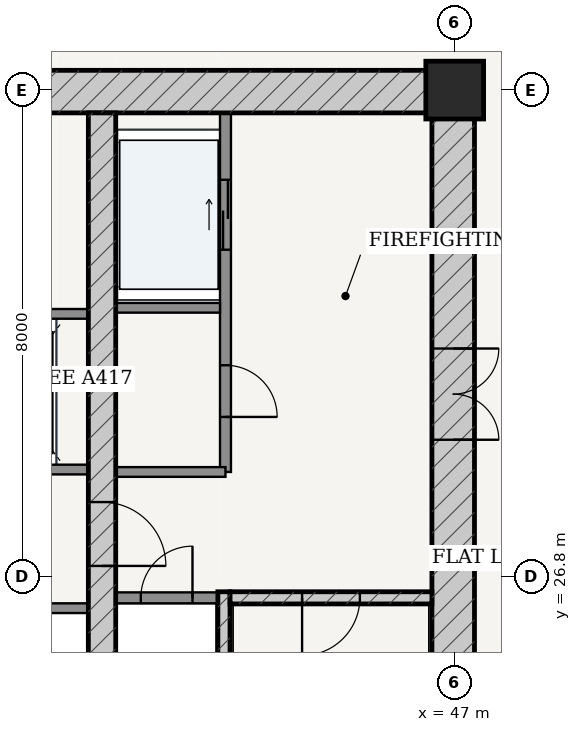
"""IFC4 building model, lengths in metres.
Left out: names, types, materials, properties, quantities, classifications, styles, units other than length and angle.
Written with IfcOpenShell. Run it as: python <this file> out.ifc"""

import sys

from ifc_helpers import new_model, si_unit, direction, frame, frame_2d, origin, origin_2d, place, context, subcontext, project, spatial, rectangle, extrude, source, transform, mapped, element, fill, save


model = new_model("IFC4")
c1 = context("Model", 3, precision=1e-05, world=origin(), true_north=direction((-0.2419218956, 0.970295726276)))
c2 = subcontext(c1, "Body", "Model", "MODEL_VIEW")
j1 = project(units=[si_unit("LENGTHUNIT", "METRE"), si_unit("PLANEANGLEUNIT", "RADIAN")], contexts=[c1])
p1 = place(None, origin())
s1 = spatial("IfcSite", under=j1, at=p1, CompositionType="ELEMENT")
p2 = place(p1, origin())
s2 = spatial("IfcBuilding", under=s1, at=p2, CompositionType="ELEMENT")
p3 = place(p2, frame((0.0, 0.0, 108.6)))
s3 = spatial("IfcBuildingStorey", under=s2, at=p3, CompositionType="ELEMENT", Elevation=108.6)
p4 = place(p3, frame((47.0, 34.8, 0.0), z_axis=(0.0, 0.0, 1.0), x_axis=(1.0, 0.0, 0.0)))
e1 = element("IfcColumn", 1, at=p4, inside=s3, PredefinedType="COLUMN", context=c2, shape_type="SweptSolid", body=[
    extrude(rectangle(XDim=0.95, YDim=0.95, at=origin_2d()), origin(), (0.0, 0.0, 1.0), 3.6),
])
p5 = place(p3, frame((28.675, 34.775, 0.0), z_axis=(0.0, 0.0, 1.0), x_axis=(1.0, 0.0, 0.0)))
e2 = element("IfcWall", 2, at=p5, inside=s3, PredefinedType="SHEAR", context=c2, shape_type="SweptSolid", body=[
    extrude(rectangle(XDim=18.65, YDim=0.7, at=frame_2d((9.325, 0.0))), origin(), (0.0, 0.0, 1.0), 3.325),
])
p6 = place(p5, frame((7.357, 0.0, 0.0)))
e3 = element("IfcOpeningElement", 3, at=p6, cuts=e2, PredefinedType="OPENING", context=c2, shape_type="SweptSolid", body=[
    extrude(rectangle(XDim=0.86, YDim=2.1, at=frame_2d((0.43, 1.05))), frame((0.0, 0.36, 0.0), z_axis=(0.0, -1.0, 0.0), x_axis=(1.0, 0.0, 0.0)), (0.0, 0.0, 1.0), 0.72),
])
p7 = place(p5, frame((10.438, 0.0, 0.0)))
e4 = element("IfcOpeningElement", 4, at=p7, cuts=e2, PredefinedType="OPENING", context=c2, shape_type="SweptSolid", body=[
    extrude(rectangle(XDim=0.85, YDim=2.1, at=frame_2d((0.425, 1.05))), frame((0.0, 0.36, 0.0), z_axis=(0.0, -1.0, 0.0), x_axis=(1.0, 0.0, 0.0)), (0.0, 0.0, 1.0), 0.72),
])
p8 = place(p3, frame((46.975, 19.175, 0.0), z_axis=(0.0, 0.0, 1.0), x_axis=(0.0, 1.0, 0.0)))
e5 = element("IfcWall", 5, at=p8, inside=s3, PredefinedType="SHEAR", context=c2, shape_type="SweptSolid", body=[
    extrude(rectangle(XDim=15.25, YDim=0.7, at=frame_2d((7.625, 0.0))), origin(), (0.0, 0.0, 1.0), 3.325),
])
p9 = place(p8, frame((9.875, 0.0, 0.0)))
e6 = element("IfcOpeningElement", 6, at=p9, cuts=e5, PredefinedType="OPENING", context=c2, shape_type="SweptSolid", body=[
    extrude(rectangle(XDim=1.5, YDim=2.2, at=frame_2d((0.75, 1.1))), frame((0.0, 0.36, 0.0), z_axis=(0.0, -1.0, 0.0), x_axis=(1.0, 0.0, 0.0)), (0.0, 0.0, 1.0), 0.72),
])
p10 = place(p3, frame((43.205, 19.175, 0.0), z_axis=(0.0, 0.0, 1.0), x_axis=(0.0, 1.0, 0.0)))
e7 = element("IfcWall", 7, at=p10, inside=s3, PredefinedType="SOLIDWALL", context=c2, shape_type="SweptSolid", body=[
    extrude(rectangle(XDim=7.375, YDim=0.2, at=frame_2d((3.688, 0.0))), origin(), (0.0, 0.0, 1.0), 3.325),
])
p11 = place(p3, frame((43.305, 26.45, 0.0), z_axis=(0.0, 0.0, 1.0), x_axis=(1.0, 0.0, 0.0)))
e8 = element("IfcWall", 8, at=p11, inside=s3, PredefinedType="SOLIDWALL", context=c2, shape_type="SweptSolid", body=[
    extrude(rectangle(XDim=3.32, YDim=0.2, at=frame_2d((1.66, 0.0))), origin(), (0.0, 0.0, 1.0), 3.325),
])
p12 = place(p11, frame((1.185, 0.0, 0.0)))
e9 = element("IfcOpeningElement", 9, at=p12, cuts=e8, PredefinedType="OPENING", context=c2, shape_type="SweptSolid", body=[
    extrude(rectangle(XDim=0.95, YDim=2.15, at=frame_2d((0.475, 1.075))), frame((0.0, 0.11, 0.0), z_axis=(0.0, -1.0, 0.0), x_axis=(1.0, 0.0, 0.0)), (0.0, 0.0, 1.0), 0.22),
])
p13 = place(p3, frame((41.2, 19.175, 0.0), z_axis=(0.0, 0.0, 1.0), x_axis=(0.0, 1.0, 0.0)))
e10 = element("IfcWall", 10, at=p13, inside=s3, PredefinedType="SHEAR", context=c2, shape_type="SweptSolid", body=[
    extrude(rectangle(XDim=15.25, YDim=0.45, at=frame_2d((7.625, 0.0))), origin(), (0.0, 0.0, 1.0), 3.325),
])
p14 = place(p13, frame((7.8, 0.0, 0.0)))
e11 = element("IfcOpeningElement", 11, at=p14, cuts=e10, PredefinedType="OPENING", context=c2, shape_type="SweptSolid", body=[
    extrude(rectangle(XDim=1.05, YDim=2.15, at=frame_2d((0.525, 1.075))), frame((0.0, 0.235, 0.0), z_axis=(0.0, -1.0, 0.0), x_axis=(1.0, 0.0, 0.0)), (0.0, 0.0, 1.0), 0.47),
])
p15 = place(p3, frame((41.425, 26.45, 0.0), z_axis=(0.0, 0.0, 1.0), x_axis=(1.0, 0.0, 0.0)))
e12 = element("IfcWall", 12, at=p15, inside=s3, PredefinedType="PARTITIONING", context=c2, shape_type="SweptSolid", body=[
    extrude(rectangle(XDim=1.675, YDim=0.18, at=frame_2d((0.837, 0.0))), origin(), (0.0, 0.0, 1.0), 3.325),
])
p16 = place(p15, frame((0.413, 0.0, 0.0)))
e13 = element("IfcOpeningElement", 13, at=p16, cuts=e12, PredefinedType="OPENING", context=c2, shape_type="SweptSolid", body=[
    extrude(rectangle(XDim=0.85, YDim=2.1, at=frame_2d((0.425, 1.05))), frame((0.0, 0.1, 0.0), z_axis=(0.0, -1.0, 0.0), x_axis=(1.0, 0.0, 0.0)), (0.0, 0.0, 1.0), 0.2),
])
p17 = place(p3, frame((43.23, 28.52, 0.0), z_axis=(0.0, 0.0, 1.0), x_axis=(0.0, 1.0, 0.0)))
e14 = element("IfcWall", 14, at=p17, inside=s3, PredefinedType="PARTITIONING", context=c2, shape_type="SweptSolid", body=[
    extrude(rectangle(XDim=5.905, YDim=0.18, at=frame_2d((2.953, 0.0))), origin(), (0.0, 0.0, 1.0), 3.325),
])
p18 = place(p17, frame((0.905, 0.0, 0.0)))
e15 = element("IfcOpeningElement", 15, at=p18, cuts=e14, PredefinedType="OPENING", context=c2, shape_type="SweptSolid", body=[
    extrude(rectangle(XDim=0.85, YDim=2.1, at=frame_2d((0.425, 1.05))), frame((0.0, 0.1, 0.0), z_axis=(0.0, -1.0, 0.0), x_axis=(1.0, 0.0, 0.0)), (0.0, 0.0, 1.0), 0.2),
])
p19 = place(p17, frame((3.655, 0.0, 0.0)))
e16 = element("IfcOpeningElement", 16, at=p19, cuts=e14, PredefinedType="OPENING", context=c2, shape_type="SweptSolid", body=[
    extrude(rectangle(XDim=1.15, YDim=2.2, at=frame_2d((0.575, 1.1))), frame((0.0, 0.1, 0.0), z_axis=(0.0, -1.0, 0.0), x_axis=(1.0, 0.0, 0.0)), (0.0, 0.0, 1.0), 0.2),
])
p20 = place(p3, frame((41.425, 31.22, 0.0), z_axis=(0.0, 0.0, 1.0), x_axis=(1.0, 0.0, 0.0)))
e17 = element("IfcWall", 17, at=p20, inside=s3, PredefinedType="PARTITIONING", context=c2, shape_type="SweptSolid", body=[
    extrude(rectangle(XDim=1.715, YDim=0.16, at=frame_2d((0.857, 0.0))), origin(), (0.0, 0.0, 1.0), 3.325),
])
p21 = place(p3, frame((41.425, 28.52, 0.0), z_axis=(0.0, 0.0, 1.0), x_axis=(1.0, 0.0, 0.0)))
e18 = element("IfcWall", 18, at=p21, inside=s3, PredefinedType="PARTITIONING", context=c2, shape_type="SweptSolid", body=[
    extrude(rectangle(XDim=1.805, YDim=0.16, at=frame_2d((0.902, 0.0))), origin(), (0.0, 0.0, 1.0), 3.325),
])
p22 = place(p3, frame((35.025, 28.56, 0.0), z_axis=(0.0, 0.0, 1.0), x_axis=(1.0, 0.0, 0.0)))
e19 = element("IfcWall", 19, at=p22, inside=s3, PredefinedType="PARTITIONING", context=c2, shape_type="SweptSolid", body=[
    extrude(rectangle(XDim=5.95, YDim=0.16, at=frame_2d((2.975, 0.0))), origin(), (0.0, 0.0, 1.0), 3.325),
])
p23 = place(p22, frame((0.76, 0.0, 0.0)))
e20 = element("IfcOpeningElement", 20, at=p23, cuts=e19, PredefinedType="OPENING", context=c2, shape_type="SweptSolid", body=[
    extrude(rectangle(XDim=1.1, YDim=2.2, at=frame_2d((0.55, 1.1))), frame((0.0, 0.09, 0.0), z_axis=(0.0, -1.0, 0.0), x_axis=(1.0, 0.0, 0.0)), (0.0, 0.0, 1.0), 0.18),
])
p24 = place(p22, frame((2.425, 0.0, 0.0)))
e21 = element("IfcOpeningElement", 21, at=p24, cuts=e19, PredefinedType="OPENING", context=c2, shape_type="SweptSolid", body=[
    extrude(rectangle(XDim=1.1, YDim=2.2, at=frame_2d((0.55, 1.1))), frame((0.0, 0.09, 0.0), z_axis=(0.0, -1.0, 0.0), x_axis=(1.0, 0.0, 0.0)), (0.0, 0.0, 1.0), 0.18),
])
p25 = place(p22, frame((4.09, 0.0, 0.0)))
e22 = element("IfcOpeningElement", 22, at=p25, cuts=e19, PredefinedType="OPENING", context=c2, shape_type="SweptSolid", body=[
    extrude(rectangle(XDim=1.1, YDim=2.2, at=frame_2d((0.55, 1.1))), frame((0.0, 0.09, 0.0), z_axis=(0.0, -1.0, 0.0), x_axis=(1.0, 0.0, 0.0)), (0.0, 0.0, 1.0), 0.18),
])
for number, where, z_axis, x_axis in (
    (23, (35.025, 31.12, 0.0), (0.0, 0.0, 1.0), (1.0, 0.0, 0.0)),
    (24, (35.025, 26.28, 0.0), (0.0, 0.0, 1.0), (1.0, 0.0, 0.0)),
):
    element("IfcWall", number, at=place(p3, frame(where, z_axis=z_axis, x_axis=x_axis)), inside=s3, PredefinedType="PARTITIONING", context=c2, shape_type="SweptSolid", body=[
        extrude(rectangle(XDim=5.95, YDim=0.16, at=frame_2d((2.975, 0.0))), origin(), (0.0, 0.0, 1.0), 3.325),
    ])
m1 = source(origin(), c2, "Body", "SweptSolid", [
    extrude(rectangle(XDim=1.5, YDim=2.2, at=frame_2d((0.75, 1.1))), frame((0.0, 0.025, 0.0), z_axis=(0.0, -1.0, 0.0), x_axis=(1.0, 0.0, 0.0)), (0.0, 0.0, 1.0), 0.05),
])
p26 = place(p9, frame((1.5, 0.0, 0.0), z_axis=(0.0, 0.0, 1.0), x_axis=(-1.0, 0.0, 0.0)))
e25 = element("IfcDoor", 25, at=p26, inside=s3, OperationType="DOUBLE_DOOR_SINGLE_SWING", PredefinedType="DOOR", context=c2, shape_type="MappedRepresentation", body=[
    mapped(m1, transform((0.0, 0.0, 0.0), scale=1.0)),
])
fill(e6, e25)
m2 = source(origin(), c2, "Body", "SweptSolid", [
    extrude(rectangle(XDim=1.05, YDim=2.15, at=frame_2d((0.525, 1.075))), frame((0.0, 0.025, 0.0), z_axis=(0.0, -1.0, 0.0), x_axis=(1.0, 0.0, 0.0)), (0.0, 0.0, 1.0), 0.05),
])
p27 = place(p14, frame((1.05, 0.0, 0.0), z_axis=(0.0, 0.0, 1.0), x_axis=(-1.0, 0.0, 0.0)))
e26 = element("IfcDoor", 26, at=p27, inside=s3, OperationType="SINGLE_SWING_RIGHT", PredefinedType="DOOR", context=c2, shape_type="MappedRepresentation", body=[
    mapped(m2, transform((0.0, 0.0, 0.0), scale=1.0)),
])
fill(e11, e26)
m3 = source(origin(), c2, "Body", "SweptSolid", [
    extrude(rectangle(XDim=0.95, YDim=2.15, at=frame_2d((0.475, 1.075))), frame((0.0, 0.025, 0.0), z_axis=(0.0, -1.0, 0.0), x_axis=(1.0, 0.0, 0.0)), (0.0, 0.0, 1.0), 0.05),
])
p28 = place(p12, frame((0.95, 0.0, 0.0), z_axis=(0.0, 0.0, 1.0), x_axis=(-1.0, 0.0, 0.0)))
e27 = element("IfcDoor", 27, at=p28, inside=s3, OperationType="SINGLE_SWING_RIGHT", PredefinedType="DOOR", context=c2, shape_type="MappedRepresentation", body=[
    mapped(m3, transform((0.0, 0.0, 0.0), scale=1.0)),
])
fill(e9, e27)
m4 = source(origin(), c2, "Body", "SweptSolid", [
    extrude(rectangle(XDim=0.85, YDim=2.1, at=frame_2d((0.425, 1.05))), frame((0.0, 0.025, 0.0), z_axis=(0.0, -1.0, 0.0), x_axis=(1.0, 0.0, 0.0)), (0.0, 0.0, 1.0), 0.05),
])
p29 = place(p16, origin())
e28 = element("IfcDoor", 28, at=p29, inside=s3, OperationType="SINGLE_SWING_RIGHT", PredefinedType="DOOR", context=c2, shape_type="MappedRepresentation", body=[
    mapped(m4, transform((0.0, 0.0, 0.0), scale=1.0)),
])
fill(e13, e28)
p30 = place(p18, frame((0.85, 0.0, 0.0), z_axis=(0.0, 0.0, 1.0), x_axis=(-1.0, 0.0, 0.0)))
e29 = element("IfcDoor", 29, at=p30, inside=s3, OperationType="SINGLE_SWING_RIGHT", PredefinedType="DOOR", context=c2, shape_type="MappedRepresentation", body=[
    mapped(m4, transform((0.0, 0.0, 0.0), scale=1.0)),
])
fill(e15, e29)
m5 = source(origin(), c2, "Body", "SweptSolid", [
    extrude(rectangle(XDim=1.15, YDim=2.2, at=frame_2d((0.575, 1.1))), frame((0.0, 0.025, 0.0), z_axis=(0.0, -1.0, 0.0), x_axis=(1.0, 0.0, 0.0)), (0.0, 0.0, 1.0), 0.05),
])
p31 = place(p19, origin())
e30 = element("IfcDoor", 30, at=p31, inside=s3, OperationType="DOUBLE_DOOR_SLIDING", PredefinedType="DOOR", context=c2, shape_type="MappedRepresentation", body=[
    mapped(m5, transform((0.0, 0.0, 0.0), scale=1.0)),
])
fill(e16, e30)
save(model, sys.argv[1])
